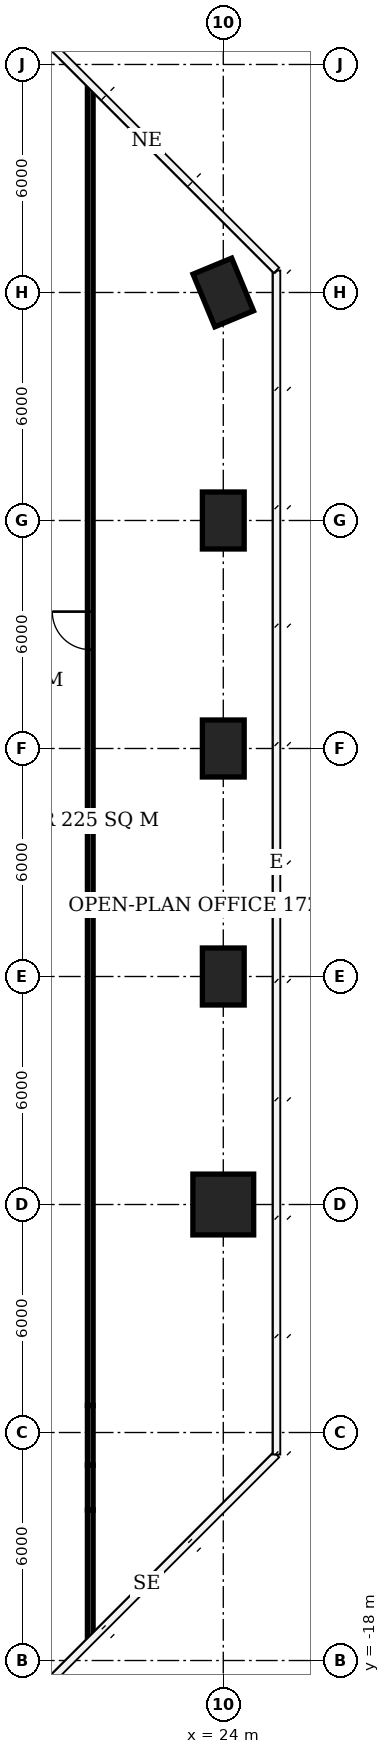
"""IFC4 building model, lengths in metres.
Left out: names, types, materials, properties, quantities, classifications, styles, units other than length and angle.
Written with IfcOpenShell. Run it as: python <this file> out.ifc"""

import sys

from ifc_helpers import new_model, si_unit, direction, frame, frame_2d, origin, origin_2d, place, context, subcontext, project, spatial, rectangle, extrude, element, fill, save


model = new_model("IFC4")
c1 = context("Model", 3, precision=1e-05, world=origin(), true_north=direction((0.0, 1.0)))
c2 = subcontext(c1, "Body", "Model", "MODEL_VIEW")
j1 = project(units=[si_unit("LENGTHUNIT", "METRE"), si_unit("PLANEANGLEUNIT", "RADIAN")], contexts=[c1])
p1 = place(None, origin())
s1 = spatial("IfcSite", under=j1, at=p1, CompositionType="ELEMENT")
p2 = place(p1, origin())
s2 = spatial("IfcBuilding", under=s1, at=p2, CompositionType="ELEMENT")
p3 = place(p2, frame((0.0, 0.0, 227.9)))
s3 = spatial("IfcBuildingStorey", under=s2, at=p3, CompositionType="ELEMENT", Elevation=227.9)
p4 = place(p3, frame((24.0, -6.0, 0.0), z_axis=(0.0, 0.0, 1.0), x_axis=(1.0, 0.0, 0.0)))
e1 = element("IfcColumn", 1, at=p4, inside=s3, PredefinedType="COLUMN", context=c2, shape_type="SweptSolid", body=[
    extrude(rectangle(XDim=1.6, YDim=1.6, at=origin_2d()), origin(), (0.0, 0.0, 1.0), 3.9),
])
for number, where, z_axis, x_axis in (
    (2, (24.0, 0.0, 0.0), (0.0, 0.0, 1.0), (0.0, 1.0, 0.0)),
    (3, (24.0, 6.0, 0.0), (0.0, 0.0, 1.0), (0.0, 1.0, 0.0)),
    (4, (24.0, 12.0, 0.0), (0.0, 0.0, 1.0), (0.0, 1.0, 0.0)),
    (5, (24.0, 18.0, 0.0), (0.0, 0.0, 1.0), (0.383, -0.924, 0.0)),
):
    element("IfcColumn", number, at=place(p3, frame(where, z_axis=z_axis, x_axis=x_axis)), inside=s3, PredefinedType="COLUMN", context=c2, shape_type="SweptSolid", body=[
        extrude(rectangle(XDim=1.5, YDim=1.1, at=origin_2d()), origin(), (0.0, 0.0, 1.0), 3.9),
    ])
p5 = place(p3, frame((20.5, -17.388, 0.0), z_axis=(0.0, 0.0, 1.0), x_axis=(0.0, 1.0, 0.0)))
e6 = element("IfcWall", 6, at=p5, inside=s3, PredefinedType="PARTITIONING", context=c2, shape_type="SweptSolid", body=[
    extrude(rectangle(XDim=3.348, YDim=0.15, at=frame_2d((1.674, 0.0))), origin(), (0.0, 0.0, 1.0), 3.65),
])
p6 = place(p3, frame((20.5, -14.04, 0.0), z_axis=(0.0, 0.0, 1.0), x_axis=(0.0, 1.0, 0.0)))
e7 = element("IfcWall", 7, at=p6, inside=s3, PredefinedType="PARTITIONING", context=c2, shape_type="SweptSolid", body=[
    extrude(rectangle(XDim=1.18, YDim=0.15, at=frame_2d((0.59, 0.0))), origin(), (0.0, 0.0, 1.0), 2.65),
])
p7 = place(p3, frame((20.5, -12.86, 0.0), z_axis=(0.0, 0.0, 1.0), x_axis=(0.0, 1.0, 0.0)))
e8 = element("IfcWall", 8, at=p7, inside=s3, PredefinedType="PARTITIONING", context=c2, shape_type="SweptSolid", body=[
    extrude(rectangle(XDim=1.57, YDim=0.15, at=frame_2d((0.785, 0.0))), origin(), (0.0, 0.0, 1.0), 2.65),
])
p8 = place(p3, frame((20.5, -11.29, 0.0), z_axis=(0.0, 0.0, 1.0), x_axis=(0.0, 1.0, 0.0)))
e9 = element("IfcWall", 9, at=p8, inside=s3, PredefinedType="PARTITIONING", context=c2, shape_type="SweptSolid", body=[
    extrude(rectangle(XDim=34.678, YDim=0.15, at=frame_2d((17.339, 0.0))), origin(), (0.0, 0.0, 1.0), 3.65),
])
p9 = place(p8, frame((19.892, 0.0, 0.0)))
e10 = element("IfcOpeningElement", 10, at=p9, cuts=e9, PredefinedType="OPENING", context=c2, shape_type="SweptSolid", body=[
    extrude(rectangle(XDim=1.0, YDim=2.1, at=frame_2d((0.5, 1.05))), frame((0.0, 0.085, 0.0), z_axis=(0.0, -1.0, 0.0), x_axis=(1.0, 0.0, 0.0)), (0.0, 0.0, 1.0), 0.17),
])
p10 = place(p9, origin())
e11 = element("IfcDoor", 11, at=p10, inside=s3, OperationType="SINGLE_SWING_RIGHT", PredefinedType="DOOR", context=c2, shape_type="SweptSolid", body=[
    extrude(rectangle(XDim=1.0, YDim=2.1, at=frame_2d((0.5, 1.05))), frame((0.0, 0.025, 0.0), z_axis=(0.0, -1.0, 0.0), x_axis=(1.0, 0.0, 0.0)), (0.0, 0.0, 1.0), 0.05),
])
fill(e10, e11)
save(model, sys.argv[1])
